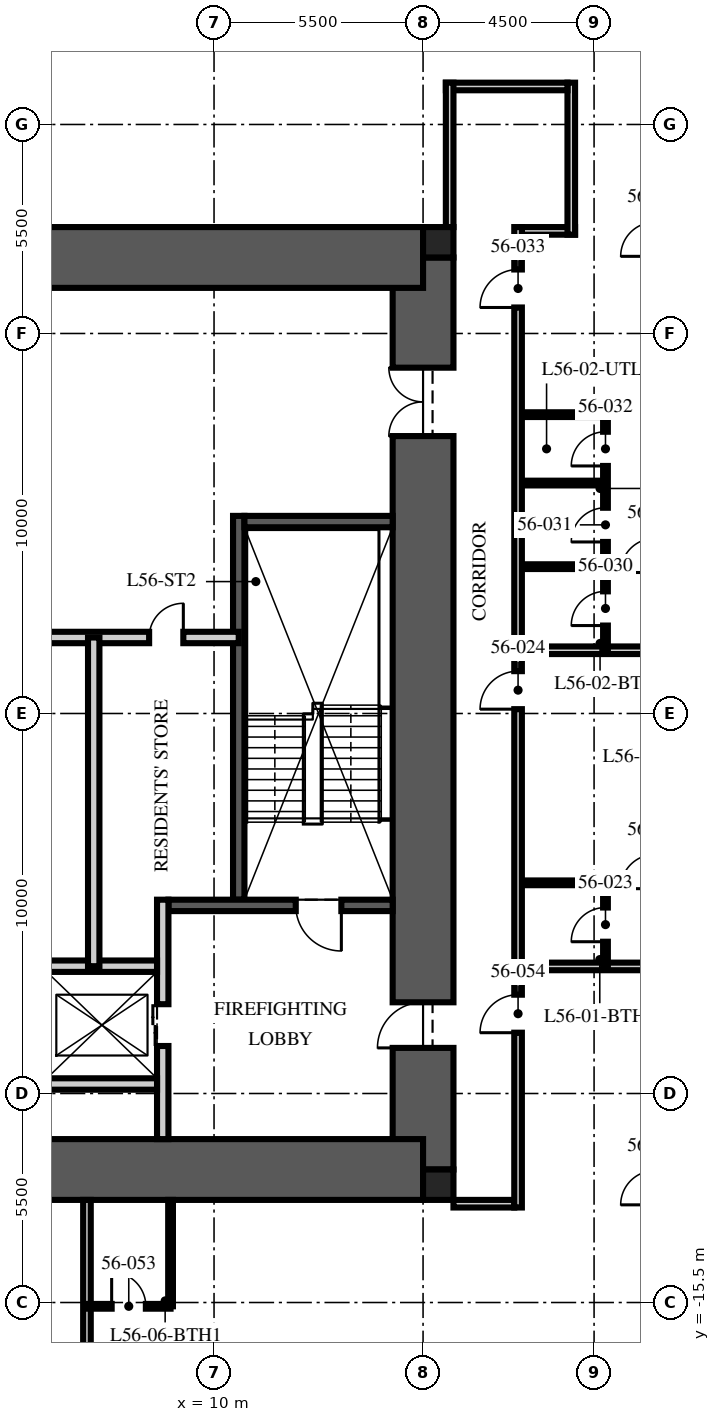
"""IFC4 building model, lengths in metres.
Left out: names, types, materials, properties, quantities, classifications, styles, units other than length and angle.
Written with IfcOpenShell. Run it as: python <this file> out.ifc"""

import sys

from ifc_helpers import new_model, si_unit, direction, frame, frame_2d, origin, origin_2d, place, context, subcontext, project, spatial, rectangle, extrude, element, fill, save


model = new_model("IFC4")
c1 = context("Model", 3, precision=1e-05, world=origin(), true_north=direction((0.0, 1.0)))
c2 = subcontext(c1, "Body", "Model", "MODEL_VIEW")
j1 = project(units=[si_unit("LENGTHUNIT", "METRE"), si_unit("PLANEANGLEUNIT", "RADIAN")], contexts=[c1])
p1 = place(None, origin())
s1 = spatial("IfcSite", under=j1, at=p1, CompositionType="ELEMENT")
p2 = place(p1, origin())
s2 = spatial("IfcBuilding", under=s1, at=p2, CompositionType="ELEMENT")
p3 = place(p2, frame((0.0, 0.0, 225.75)))
s3 = spatial("IfcBuildingStorey", under=s2, at=p3, CompositionType="ELEMENT", Elevation=225.75)
p4 = place(p3, frame((15.5, -12.0, -0.25), z_axis=(0.0, 0.0, 1.0), x_axis=(0.0, 1.0, 0.0)))
e1 = element("IfcWall", 1, at=p4, inside=s3, PredefinedType="SHEAR", context=c2, shape_type="SweptSolid", body=[
    extrude(rectangle(XDim=24.0, YDim=1.6, at=frame_2d((12.0, 0.0))), origin(), (0.0, 0.0, 1.0), 3.75),
])
p5 = place(p4, frame((3.2, 0.0, 0.25)))
e2 = element("IfcOpeningElement", 2, at=p5, cuts=e1, PredefinedType="OPENING", context=c2, shape_type="SweptSolid", body=[
    extrude(rectangle(XDim=1.2, YDim=2.1, at=frame_2d((0.6, 1.05))), frame((0.0, 0.81, 0.0), z_axis=(0.0, -1.0, 0.0), x_axis=(1.0, 0.0, 0.0)), (0.0, 0.0, 1.0), 1.62),
])
p6 = place(p4, frame((19.3, 0.0, 0.25)))
e3 = element("IfcOpeningElement", 3, at=p6, cuts=e1, PredefinedType="OPENING", context=c2, shape_type="SweptSolid", body=[
    extrude(rectangle(XDim=1.8, YDim=2.1, at=frame_2d((0.9, 1.05))), frame((0.0, 0.81, 0.0), z_axis=(0.0, -1.0, 0.0), x_axis=(1.0, 0.0, 0.0)), (0.0, 0.0, 1.0), 1.62),
])
for number, where, z_axis, x_axis in (
    (4, (-15.5, 12.0, -0.25), (0.0, 0.0, 1.0), (1.0, 0.0, 0.0)),
    (5, (-15.5, -12.0, -0.25), (0.0, 0.0, 1.0), (1.0, 0.0, 0.0)),
):
    element("IfcWall", number, at=place(p3, frame(where, z_axis=z_axis, x_axis=x_axis)), inside=s3, PredefinedType="SHEAR", context=c2, shape_type="SweptSolid", body=[
        extrude(rectangle(XDim=31.0, YDim=1.6, at=frame_2d((15.5, 0.0))), origin(), (0.0, 0.0, 1.0), 3.75),
    ])
for number, where, z_axis, x_axis in (
    (6, (15.9, 12.4, -0.25), (0.0, 0.0, 1.0), (1.0, 0.0, 0.0)),
    (7, (15.9, -12.4, -0.25), (0.0, 0.0, 1.0), (1.0, 0.0, 0.0)),
):
    element("IfcColumn", number, at=place(p3, frame(where, z_axis=z_axis, x_axis=x_axis)), inside=s3, PredefinedType="COLUMN", context=c2, shape_type="SweptSolid", body=[
        extrude(rectangle(XDim=0.8, YDim=0.8, at=origin_2d()), origin(), (0.0, 0.0, 1.0), 3.75),
    ])
p7 = place(p3, frame((10.65, -4.9, 0.0), z_axis=(0.0, 0.0, 1.0), x_axis=(0.0, 1.0, 0.0)))
e8 = element("IfcWall", 8, at=p7, inside=s3, PredefinedType="SOLIDWALL", context=c2, shape_type="SweptSolid", body=[
    extrude(rectangle(XDim=10.1, YDim=0.3, at=frame_2d((5.05, 0.0))), origin(), (0.0, 0.0, 1.0), 3.5),
])
p8 = place(p3, frame((14.7, -5.05, 0.0), z_axis=(0.0, 0.0, 1.0), x_axis=(-1.0, 0.0, 0.0)))
e9 = element("IfcWall", 9, at=p8, inside=s3, PredefinedType="SOLIDWALL", context=c2, shape_type="SweptSolid", body=[
    extrude(rectangle(XDim=5.9, YDim=0.3, at=frame_2d((2.95, 0.0))), origin(), (0.0, 0.0, 1.0), 3.5),
])
p9 = place(p8, frame((1.35, 0.0, 0.0)))
e10 = element("IfcOpeningElement", 10, at=p9, cuts=e9, PredefinedType="OPENING", context=c2, shape_type="SweptSolid", body=[
    extrude(rectangle(XDim=1.2, YDim=2.1, at=frame_2d((0.6, 1.05))), frame((0.0, 0.16, 0.0), z_axis=(0.0, -1.0, 0.0), x_axis=(1.0, 0.0, 0.0)), (0.0, 0.0, 1.0), 0.32),
])
p10 = place(p3, frame((14.7, 5.05, 0.0), z_axis=(0.0, 0.0, 1.0), x_axis=(-1.0, 0.0, 0.0)))
e11 = element("IfcWall", 11, at=p10, inside=s3, PredefinedType="SOLIDWALL", context=c2, shape_type="SweptSolid", body=[
    extrude(rectangle(XDim=3.9, YDim=0.3, at=frame_2d((1.95, 0.0))), origin(), (0.0, 0.0, 1.0), 3.5),
])
p11 = place(p3, frame((8.65, -11.2, 0.0), z_axis=(0.0, 0.0, 1.0), x_axis=(0.0, 1.0, 0.0)))
e12 = element("IfcWall", 12, at=p11, inside=s3, PredefinedType="PARTITIONING", context=c2, shape_type="SweptSolid", body=[
    extrude(rectangle(XDim=6.3, YDim=0.3, at=frame_2d((3.15, 0.0))), origin(), (0.0, 0.0, 1.0), 3.5),
])
p12 = place(p11, frame((2.45, 0.0, 0.0)))
e13 = element("IfcOpeningElement", 13, at=p12, cuts=e12, PredefinedType="OPENING", context=c2, shape_type="SweptSolid", body=[
    extrude(rectangle(XDim=1.1, YDim=2.1, at=frame_2d((0.55, 1.05))), frame((0.0, 0.16, 0.0), z_axis=(0.0, -1.0, 0.0), x_axis=(1.0, 0.0, 0.0)), (0.0, 0.0, 1.0), 0.32),
])
p13 = place(p3, frame((-8.5, -6.65, 0.0), z_axis=(0.0, 0.0, 1.0), x_axis=(1.0, 0.0, 0.0)))
e14 = element("IfcWall", 14, at=p13, inside=s3, PredefinedType="PARTITIONING", context=c2, shape_type="SweptSolid", body=[
    extrude(rectangle(XDim=17.0, YDim=0.3, at=frame_2d((8.5, 0.0))), origin(), (0.0, 0.0, 1.0), 3.5),
])
p14 = place(p13, frame((7.8, 0.0, 0.0)))
e15 = element("IfcOpeningElement", 15, at=p14, cuts=e14, PredefinedType="OPENING", context=c2, shape_type="SweptSolid", body=[
    extrude(rectangle(XDim=1.3, YDim=2.4, at=frame_2d((0.65, 1.2))), frame((0.0, 0.16, 0.0), z_axis=(0.0, -1.0, 0.0), x_axis=(1.0, 0.0, 0.0)), (0.0, 0.0, 1.0), 0.32),
])
p15 = place(p13, frame((5.65, 0.0, 0.0)))
e16 = element("IfcOpeningElement", 16, at=p15, cuts=e14, PredefinedType="OPENING", context=c2, shape_type="SweptSolid", body=[
    extrude(rectangle(XDim=0.9, YDim=2.1, at=frame_2d((0.45, 1.05))), frame((0.0, 0.16, 0.0), z_axis=(0.0, -1.0, 0.0), x_axis=(1.0, 0.0, 0.0)), (0.0, 0.0, 1.0), 0.32),
])
p16 = place(p13, frame((10.4, 0.0, 0.0)))
e17 = element("IfcOpeningElement", 17, at=p16, cuts=e14, PredefinedType="OPENING", context=c2, shape_type="SweptSolid", body=[
    extrude(rectangle(XDim=0.9, YDim=2.1, at=frame_2d((0.45, 1.05))), frame((0.0, 0.16, 0.0), z_axis=(0.0, -1.0, 0.0), x_axis=(1.0, 0.0, 0.0)), (0.0, 0.0, 1.0), 0.32),
])
p17 = place(p3, frame((5.6, -9.75, 0.0), z_axis=(0.0, 0.0, 1.0), x_axis=(1.0, 0.0, 0.0)))
e18 = element("IfcWall", 18, at=p17, inside=s3, PredefinedType="PARTITIONING", context=c2, shape_type="SweptSolid", body=[
    extrude(rectangle(XDim=2.9, YDim=0.3, at=frame_2d((1.45, 0.0))), origin(), (0.0, 0.0, 1.0), 3.5),
])
p18 = place(p3, frame((-10.65, 2.0, 0.0), z_axis=(0.0, 0.0, 1.0), x_axis=(1.0, 0.0, 0.0)))
e19 = element("IfcWall", 19, at=p18, inside=s3, PredefinedType="PARTITIONING", context=c2, shape_type="SweptSolid", body=[
    extrude(rectangle(XDim=21.3, YDim=0.3, at=frame_2d((10.65, 0.0))), origin(), (0.0, 0.0, 1.0), 3.5),
])
p19 = place(p18, frame((10.05, 0.0, 0.0)))
e20 = element("IfcOpeningElement", 20, at=p19, cuts=e19, PredefinedType="OPENING", context=c2, shape_type="SweptSolid", body=[
    extrude(rectangle(XDim=1.2, YDim=2.1, at=frame_2d((0.6, 1.05))), frame((0.0, 0.16, 0.0), z_axis=(0.0, -1.0, 0.0), x_axis=(1.0, 0.0, 0.0)), (0.0, 0.0, 1.0), 0.32),
])
p20 = place(p18, frame((18.942, 0.0, 0.0)))
e21 = element("IfcOpeningElement", 21, at=p20, cuts=e19, PredefinedType="OPENING", context=c2, shape_type="SweptSolid", body=[
    extrude(rectangle(XDim=0.9, YDim=2.1, at=frame_2d((0.45, 1.05))), frame((0.0, 0.16, 0.0), z_axis=(0.0, -1.0, 0.0), x_axis=(1.0, 0.0, 0.0)), (0.0, 0.0, 1.0), 0.32),
])
p21 = place(p3, frame((6.834, -6.65, 0.0), z_axis=(0.0, 0.0, 1.0), x_axis=(0.0, 1.0, 0.0)))
e22 = element("IfcWall", 22, at=p21, inside=s3, PredefinedType="PARTITIONING", context=c2, shape_type="SweptSolid", body=[
    extrude(rectangle(XDim=8.65, YDim=0.3, at=frame_2d((4.325, 0.0))), origin(), (0.0, 0.0, 1.0), 3.5),
])
p22 = place(p3, frame((18.1, 12.7, 0.0), z_axis=(0.0, 0.0, 1.0), x_axis=(1.0, 0.0, 0.0)))
e23 = element("IfcWall", 23, at=p22, inside=s3, PredefinedType="PARTITIONING", context=c2, shape_type="SweptSolid", body=[
    extrude(rectangle(XDim=1.4, YDim=0.2, at=frame_2d((0.7, 0.0))), origin(), (0.0, 0.0, 1.0), 2.81),
])
p23 = place(p3, frame((19.4, 12.6, 0.0), z_axis=(0.0, 0.0, 1.0), x_axis=(0.0, 1.0, 0.0)))
e24 = element("IfcWall", 24, at=p23, inside=s3, PredefinedType="PARTITIONING", context=c2, shape_type="SweptSolid", body=[
    extrude(rectangle(XDim=4.0, YDim=0.2, at=frame_2d((2.0, 0.0))), origin(), (0.0, 0.0, 1.0), 2.6),
])
p24 = place(p3, frame((19.3, 16.5, 0.0), z_axis=(0.0, 0.0, 1.0), x_axis=(-1.0, 0.0, 0.0)))
e25 = element("IfcWall", 25, at=p24, inside=s3, PredefinedType="PARTITIONING", context=c2, shape_type="SweptSolid", body=[
    extrude(rectangle(XDim=3.2, YDim=0.2, at=frame_2d((1.6, 0.0))), origin(), (0.0, 0.0, 1.0), 2.3),
])
p25 = place(p3, frame((16.2, 16.6, 0.0), z_axis=(0.0, 0.0, 1.0), x_axis=(0.0, -1.0, 0.0)))
e26 = element("IfcWall", 26, at=p25, inside=s3, PredefinedType="PARTITIONING", context=c2, shape_type="SweptSolid", body=[
    extrude(rectangle(XDim=3.8, YDim=0.2, at=frame_2d((1.9, 0.0))), origin(), (0.0, 0.0, 1.0), 2.3),
])
p26 = place(p3, frame((16.3, -12.9, 0.0), z_axis=(0.0, 0.0, 1.0), x_axis=(1.0, 0.0, 0.0)))
e27 = element("IfcWall", 27, at=p26, inside=s3, PredefinedType="PARTITIONING", context=c2, shape_type="SweptSolid", body=[
    extrude(rectangle(XDim=1.6, YDim=0.2, at=frame_2d((0.8, 0.0))), origin(), (0.0, 0.0, 1.0), 2.3),
])
for number, where, z_axis, x_axis in (
    (28, (18.1, -6.656, 0.0), (0.0, 0.0, 1.0), (1.0, 0.0, 0.0)),
    (29, (18.1, 1.664, 0.0), (0.0, 0.0, 1.0), (1.0, 0.0, 0.0)),
):
    element("IfcWall", number, at=place(p3, frame(where, z_axis=z_axis, x_axis=x_axis)), inside=s3, PredefinedType="PARTITIONING", context=c2, shape_type="SweptSolid", body=[
        extrude(rectangle(XDim=8.1, YDim=0.2, at=frame_2d((4.05, 0.0))), origin(), (0.0, 0.0, 1.0), 2.91),
    ])
p27 = place(p3, frame((6.656, -12.8, 0.0), z_axis=(0.0, 0.0, 1.0), x_axis=(0.0, -1.0, 0.0)))
e30 = element("IfcWall", 30, at=p27, inside=s3, PredefinedType="PARTITIONING", context=c2, shape_type="SweptSolid", body=[
    extrude(rectangle(XDim=13.4, YDim=0.2, at=frame_2d((6.7, 0.0))), origin(), (0.0, 0.0, 1.0), 2.91),
])
p28 = place(p3, frame((20.3, -6.656, 0.0), z_axis=(0.0, 0.0, 1.0), x_axis=(0.0, 1.0, 0.0)))
e31 = element("IfcWall", 31, at=p28, inside=s3, PredefinedType="PARTITIONING", context=c2, shape_type="SweptSolid", body=[
    extrude(rectangle(XDim=2.2, YDim=0.125, at=frame_2d((1.1, 0.0))), origin(), (0.0, 0.0, 1.0), 3.5),
])
p29 = place(p28, frame((0.65, 0.0, 0.0)))
e32 = element("IfcOpeningElement", 32, at=p29, cuts=e31, PredefinedType="OPENING", context=c2, shape_type="SweptSolid", body=[
    extrude(rectangle(XDim=0.9, YDim=2.1, at=frame_2d((0.45, 1.05))), frame((0.0, 0.073, 0.0), z_axis=(0.0, -1.0, 0.0), x_axis=(1.0, 0.0, 0.0)), (0.0, 0.0, 1.0), 0.145),
])
p30 = place(p3, frame((18.1, -4.456, 0.0), z_axis=(0.0, 0.0, 1.0), x_axis=(1.0, 0.0, 0.0)))
e33 = element("IfcWall", 33, at=p30, inside=s3, PredefinedType="PARTITIONING", context=c2, shape_type="SweptSolid", body=[
    extrude(rectangle(XDim=2.2, YDim=0.125, at=frame_2d((1.1, 0.0))), origin(), (0.0, 0.0, 1.0), 3.5),
])
p31 = place(p3, frame((20.3, 1.664, 0.0), z_axis=(0.0, 0.0, 1.0), x_axis=(0.0, 1.0, 0.0)))
e34 = element("IfcWall", 34, at=p31, inside=s3, PredefinedType="PARTITIONING", context=c2, shape_type="SweptSolid", body=[
    extrude(rectangle(XDim=6.2, YDim=0.125, at=frame_2d((3.1, 0.0))), origin(), (0.0, 0.0, 1.0), 2.81),
])
p32 = place(p31, frame((0.65, 0.0, 0.0)))
e35 = element("IfcOpeningElement", 35, at=p32, cuts=e34, PredefinedType="OPENING", context=c2, shape_type="SweptSolid", body=[
    extrude(rectangle(XDim=0.9, YDim=2.1, at=frame_2d((0.45, 1.05))), frame((0.0, 0.073, 0.0), z_axis=(0.0, -1.0, 0.0), x_axis=(1.0, 0.0, 0.0)), (0.0, 0.0, 1.0), 0.145),
])
p33 = place(p31, frame((2.85, 0.0, 0.0)))
e36 = element("IfcOpeningElement", 36, at=p33, cuts=e34, PredefinedType="OPENING", context=c2, shape_type="SweptSolid", body=[
    extrude(rectangle(XDim=0.9, YDim=2.1, at=frame_2d((0.45, 1.05))), frame((0.0, 0.073, 0.0), z_axis=(0.0, -1.0, 0.0), x_axis=(1.0, 0.0, 0.0)), (0.0, 0.0, 1.0), 0.145),
])
p34 = place(p31, frame((4.85, 0.0, 0.0)))
e37 = element("IfcOpeningElement", 37, at=p34, cuts=e34, PredefinedType="OPENING", context=c2, shape_type="SweptSolid", body=[
    extrude(rectangle(XDim=0.9, YDim=2.1, at=frame_2d((0.45, 1.05))), frame((0.0, 0.073, 0.0), z_axis=(0.0, -1.0, 0.0), x_axis=(1.0, 0.0, 0.0)), (0.0, 0.0, 1.0), 0.145),
])
for number, where, z_axis, x_axis in (
    (38, (18.1, 3.864, 0.0), (0.0, 0.0, 1.0), (1.0, 0.0, 0.0)),
    (39, (18.1, 6.064, 0.0), (0.0, 0.0, 1.0), (1.0, 0.0, 0.0)),
    (40, (18.1, 7.864, 0.0), (0.0, 0.0, 1.0), (1.0, 0.0, 0.0)),
):
    element("IfcWall", number, at=place(p3, frame(where, z_axis=z_axis, x_axis=x_axis)), inside=s3, PredefinedType="PARTITIONING", context=c2, shape_type="SweptSolid", body=[
        extrude(rectangle(XDim=2.2, YDim=0.125, at=frame_2d((1.1, 0.0))), origin(), (0.0, 0.0, 1.0), 3.5),
    ])
p35 = place(p3, frame((6.656, -15.6, 0.0), z_axis=(0.0, 0.0, 1.0), x_axis=(1.0, 0.0, 0.0)))
e41 = element("IfcWall", 41, at=p35, inside=s3, PredefinedType="PARTITIONING", context=c2, shape_type="SweptSolid", body=[
    extrude(rectangle(XDim=2.2, YDim=0.125, at=frame_2d((1.1, 0.0))), origin(), (0.0, 0.0, 1.0), 2.6),
])
p36 = place(p35, frame((0.65, 0.0, 0.0)))
e42 = element("IfcOpeningElement", 42, at=p36, cuts=e41, PredefinedType="OPENING", context=c2, shape_type="SweptSolid", body=[
    extrude(rectangle(XDim=0.9, YDim=2.1, at=frame_2d((0.45, 1.05))), frame((0.0, 0.073, 0.0), z_axis=(0.0, -1.0, 0.0), x_axis=(1.0, 0.0, 0.0)), (0.0, 0.0, 1.0), 0.145),
])
p37 = place(p3, frame((8.856, -12.8, 0.0), z_axis=(0.0, 0.0, 1.0), x_axis=(0.0, -1.0, 0.0)))
e43 = element("IfcWall", 43, at=p37, inside=s3, PredefinedType="PARTITIONING", context=c2, shape_type="SweptSolid", body=[
    extrude(rectangle(XDim=2.8, YDim=0.125, at=frame_2d((1.4, 0.0))), origin(), (0.0, 0.0, 1.0), 3.5),
])
p38 = place(p3, frame((18.0, -13.0, 0.0), z_axis=(0.0, 0.0, 1.0), x_axis=(0.0, 1.0, 0.0)))
e44 = element("IfcWall", 44, at=p38, inside=s3, PredefinedType="PARTITIONING", context=c2, shape_type="SweptSolid", body=[
    extrude(rectangle(XDim=25.8, YDim=0.2, at=frame_2d((12.9, 0.0))), origin(), (0.0, 0.0, 1.0), 2.6),
])
p39 = place(p38, frame((13.114, 0.0, 0.0)))
e45 = element("IfcOpeningElement", 45, at=p39, cuts=e44, PredefinedType="OPENING", context=c2, shape_type="SweptSolid", body=[
    extrude(rectangle(XDim=1.0, YDim=2.2, at=frame_2d((0.5, 1.1))), frame((0.0, 0.11, 0.0), z_axis=(0.0, -1.0, 0.0), x_axis=(1.0, 0.0, 0.0)), (0.0, 0.0, 1.0), 0.22),
])
p40 = place(p38, frame((23.684, 0.0, 0.0)))
e46 = element("IfcOpeningElement", 46, at=p40, cuts=e44, PredefinedType="OPENING", context=c2, shape_type="SweptSolid", body=[
    extrude(rectangle(XDim=1.0, YDim=2.2, at=frame_2d((0.5, 1.1))), frame((0.0, 0.11, 0.0), z_axis=(0.0, -1.0, 0.0), x_axis=(1.0, 0.0, 0.0)), (0.0, 0.0, 1.0), 0.22),
])
p41 = place(p38, frame((4.6, 0.0, 0.0)))
e47 = element("IfcOpeningElement", 47, at=p41, cuts=e44, PredefinedType="OPENING", context=c2, shape_type="SweptSolid", body=[
    extrude(rectangle(XDim=1.0, YDim=2.2, at=frame_2d((0.5, 1.1))), frame((0.0, 0.11, 0.0), z_axis=(0.0, -1.0, 0.0), x_axis=(1.0, 0.0, 0.0)), (0.0, 0.0, 1.0), 0.22),
])
p42 = place(p9, origin())
e48 = element("IfcDoor", 48, at=p42, inside=s3, OperationType="SINGLE_SWING_LEFT", PredefinedType="DOOR", context=c2, shape_type="SweptSolid", body=[
    extrude(rectangle(XDim=1.2, YDim=2.1, at=frame_2d((0.6, 1.05))), frame((0.0, 0.025, 0.0), z_axis=(0.0, -1.0, 0.0), x_axis=(1.0, 0.0, 0.0)), (0.0, 0.0, 1.0), 0.05),
])
fill(e10, e48)
p43 = place(p5, origin())
e49 = element("IfcDoor", 49, at=p43, inside=s3, OperationType="SINGLE_SWING_LEFT", PredefinedType="DOOR", context=c2, shape_type="SweptSolid", body=[
    extrude(rectangle(XDim=1.2, YDim=2.1, at=frame_2d((0.6, 1.05))), frame((0.0, 0.025, 0.0), z_axis=(0.0, -1.0, 0.0), x_axis=(1.0, 0.0, 0.0)), (0.0, 0.0, 1.0), 0.05),
])
fill(e2, e49)
p44 = place(p6, origin())
e50 = element("IfcDoor", 50, at=p44, inside=s3, OperationType="DOUBLE_DOOR_SINGLE_SWING", PredefinedType="DOOR", context=c2, shape_type="SweptSolid", body=[
    extrude(rectangle(XDim=1.8, YDim=2.1, at=frame_2d((0.9, 1.05))), frame((0.0, 0.025, 0.0), z_axis=(0.0, -1.0, 0.0), x_axis=(1.0, 0.0, 0.0)), (0.0, 0.0, 1.0), 0.05),
])
fill(e3, e50)
p45 = place(p12, origin())
e51 = element("IfcDoor", 51, at=p45, inside=s3, OperationType="DOUBLE_DOOR_SLIDING", PredefinedType="DOOR", context=c2, shape_type="SweptSolid", body=[
    extrude(rectangle(XDim=1.1, YDim=2.1, at=frame_2d((0.55, 1.05))), frame((0.0, 0.025, 0.0), z_axis=(0.0, -1.0, 0.0), x_axis=(1.0, 0.0, 0.0)), (0.0, 0.0, 1.0), 0.05),
])
fill(e13, e51)
p46 = place(p20, origin())
e52 = element("IfcDoor", 52, at=p46, inside=s3, OperationType="SINGLE_SWING_RIGHT", PredefinedType="DOOR", context=c2, shape_type="SweptSolid", body=[
    extrude(rectangle(XDim=0.9, YDim=2.1, at=frame_2d((0.45, 1.05))), frame((0.0, 0.025, 0.0), z_axis=(0.0, -1.0, 0.0), x_axis=(1.0, 0.0, 0.0)), (0.0, 0.0, 1.0), 0.05),
])
fill(e21, e52)
p47 = place(p29, origin())
e53 = element("IfcDoor", 53, at=p47, inside=s3, OperationType="SINGLE_SWING_LEFT", PredefinedType="DOOR", context=c2, shape_type="SweptSolid", body=[
    extrude(rectangle(XDim=0.9, YDim=2.1, at=frame_2d((0.45, 1.05))), frame((0.0, 0.025, 0.0), z_axis=(0.0, -1.0, 0.0), x_axis=(1.0, 0.0, 0.0)), (0.0, 0.0, 1.0), 0.05),
])
fill(e32, e53)
p48 = place(p39, origin())
e54 = element("IfcDoor", 54, at=p48, inside=s3, OperationType="SINGLE_SWING_LEFT", PredefinedType="DOOR", context=c2, shape_type="SweptSolid", body=[
    extrude(rectangle(XDim=1.0, YDim=2.2, at=frame_2d((0.5, 1.1))), frame((0.0, 0.025, 0.0), z_axis=(0.0, -1.0, 0.0), x_axis=(1.0, 0.0, 0.0)), (0.0, 0.0, 1.0), 0.05),
])
fill(e45, e54)
p49 = place(p32, origin())
e55 = element("IfcDoor", 55, at=p49, inside=s3, OperationType="SINGLE_SWING_LEFT", PredefinedType="DOOR", context=c2, shape_type="SweptSolid", body=[
    extrude(rectangle(XDim=0.9, YDim=2.1, at=frame_2d((0.45, 1.05))), frame((0.0, 0.025, 0.0), z_axis=(0.0, -1.0, 0.0), x_axis=(1.0, 0.0, 0.0)), (0.0, 0.0, 1.0), 0.05),
])
fill(e35, e55)
p50 = place(p33, origin())
e56 = element("IfcDoor", 56, at=p50, inside=s3, OperationType="SINGLE_SWING_LEFT", PredefinedType="DOOR", context=c2, shape_type="SweptSolid", body=[
    extrude(rectangle(XDim=0.9, YDim=2.1, at=frame_2d((0.45, 1.05))), frame((0.0, 0.025, 0.0), z_axis=(0.0, -1.0, 0.0), x_axis=(1.0, 0.0, 0.0)), (0.0, 0.0, 1.0), 0.05),
])
fill(e36, e56)
p51 = place(p34, origin())
e57 = element("IfcDoor", 57, at=p51, inside=s3, OperationType="SINGLE_SWING_LEFT", PredefinedType="DOOR", context=c2, shape_type="SweptSolid", body=[
    extrude(rectangle(XDim=0.9, YDim=2.1, at=frame_2d((0.45, 1.05))), frame((0.0, 0.025, 0.0), z_axis=(0.0, -1.0, 0.0), x_axis=(1.0, 0.0, 0.0)), (0.0, 0.0, 1.0), 0.05),
])
fill(e37, e57)
p52 = place(p40, origin())
e58 = element("IfcDoor", 58, at=p52, inside=s3, OperationType="SINGLE_SWING_LEFT", PredefinedType="DOOR", context=c2, shape_type="SweptSolid", body=[
    extrude(rectangle(XDim=1.0, YDim=2.2, at=frame_2d((0.5, 1.1))), frame((0.0, 0.025, 0.0), z_axis=(0.0, -1.0, 0.0), x_axis=(1.0, 0.0, 0.0)), (0.0, 0.0, 1.0), 0.05),
])
fill(e46, e58)
p53 = place(p36, origin())
e59 = element("IfcDoor", 59, at=p53, inside=s3, OperationType="SINGLE_SWING_LEFT", PredefinedType="DOOR", context=c2, shape_type="SweptSolid", body=[
    extrude(rectangle(XDim=0.9, YDim=2.1, at=frame_2d((0.45, 1.05))), frame((0.0, 0.025, 0.0), z_axis=(0.0, -1.0, 0.0), x_axis=(1.0, 0.0, 0.0)), (0.0, 0.0, 1.0), 0.05),
])
fill(e42, e59)
p54 = place(p41, origin())
e60 = element("IfcDoor", 60, at=p54, inside=s3, OperationType="SINGLE_SWING_LEFT", PredefinedType="DOOR", context=c2, shape_type="SweptSolid", body=[
    extrude(rectangle(XDim=1.0, YDim=2.2, at=frame_2d((0.5, 1.1))), frame((0.0, 0.025, 0.0), z_axis=(0.0, -1.0, 0.0), x_axis=(1.0, 0.0, 0.0)), (0.0, 0.0, 1.0), 0.05),
])
fill(e47, e60)
save(model, sys.argv[1])
